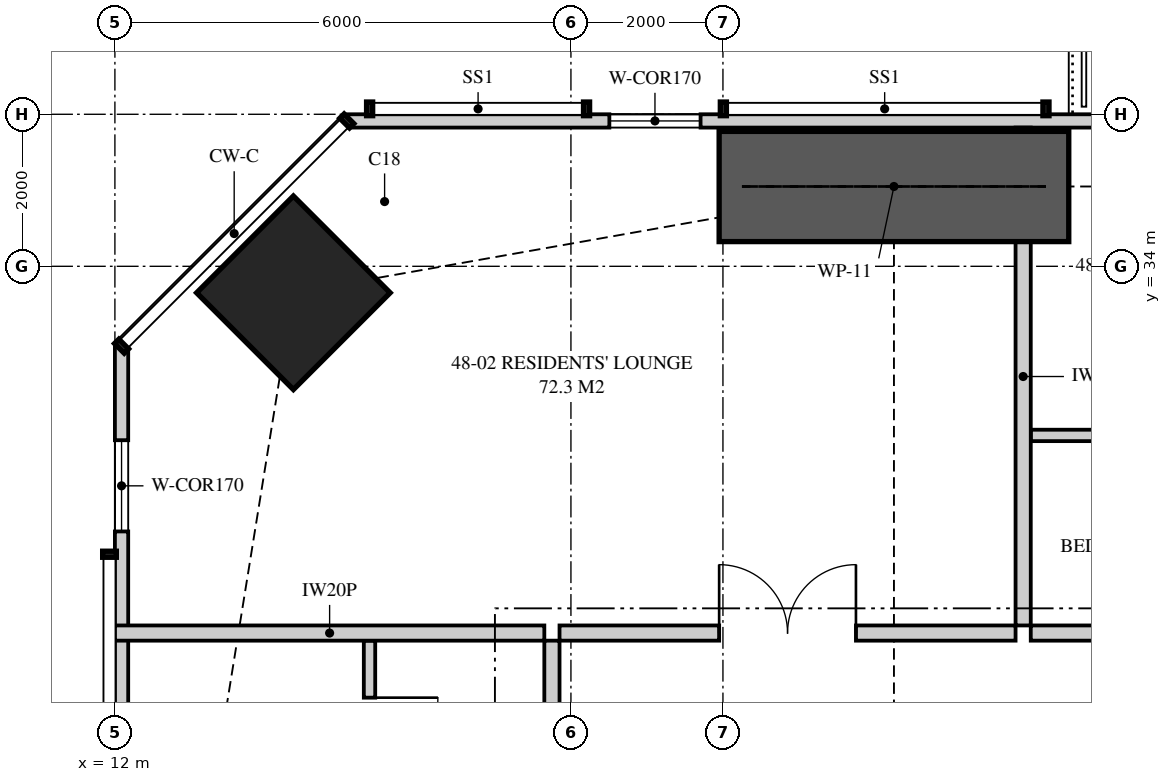
"""IFC4 building model, lengths in metres.
Left out: names, types, materials, properties, quantities, classifications, styles, units other than length and angle.
Written with IfcOpenShell. Run it as: python <this file> out.ifc"""

import sys

from ifc_helpers import new_model, si_unit, direction, frame, frame_2d, origin, origin_2d, place, context, subcontext, project, spatial, polyline, rectangle, outline, extrude, element, fill, save


model = new_model("IFC4")
c1 = context("Model", 3, precision=1e-05, world=origin(), true_north=direction((0.0, 1.0)))
c2 = subcontext(c1, "Body", "Model", "MODEL_VIEW")
j1 = project(units=[si_unit("LENGTHUNIT", "METRE"), si_unit("PLANEANGLEUNIT", "RADIAN")], contexts=[c1])
p1 = place(None, origin())
s1 = spatial("IfcSite", under=j1, at=p1, CompositionType="ELEMENT")
p2 = place(p1, origin())
s2 = spatial("IfcBuilding", under=s1, at=p2, CompositionType="ELEMENT")
p3 = place(p2, frame((0.0, 0.0, 177.8)))
s3 = spatial("IfcBuildingStorey", under=s2, at=p3, CompositionType="ELEMENT", Elevation=177.8)
p4 = place(p3, frame((14.348, 33.652, 0.0), z_axis=(0.0, 0.0, 1.0), x_axis=(0.707106781187, 0.707106781187, 0.0)))
e1 = element("IfcColumn", 1, at=p4, inside=s3, PredefinedType="COLUMN", context=c2, shape_type="SweptSolid", body=[
    extrude(rectangle(XDim=1.8, YDim=1.8, at=origin_2d()), origin(), (0.0, 0.0, 1.0), 3.35),
])
p5 = place(p3, frame((49.949, 35.913, 0.0), z_axis=(0.0, 0.0, 1.0), x_axis=(-1.0, 0.0, 0.0)))
e2 = element("IfcWall", 2, at=p5, inside=s3, PredefinedType="SOLIDWALL", context=c2, shape_type="SweptSolid", body=[
    extrude(outline(polyline([(0.0, 0.0), (34.897, 0.0), (34.897, 3.11), (27.91, 3.11), (27.91, 2.15), (27.836, 2.15), (27.836, 3.11), (27.699, 3.11), (27.699, 2.15), (7.199, 2.15), (7.199, 3.11), (7.062, 3.11), (7.062, 2.15), (6.987, 2.15), (6.987, 3.11), (0.0, 3.11), (0.0, 0.0)])), frame((0.0, 0.087, 0.0), z_axis=(0.0, -1.0, 0.0), x_axis=(1.0, 0.0, 0.0)), (0.0, 0.0, 1.0), 0.175),
])
p6 = place(p5, frame((2.3, 0.0, 0.4)))
e3 = element("IfcOpeningElement", 3, at=p6, cuts=e2, PredefinedType="OPENING", context=c2, shape_type="SweptSolid", body=[
    extrude(rectangle(XDim=2.4, YDim=1.7, at=frame_2d((1.2, 0.85))), frame((0.0, 0.097, 0.0), z_axis=(0.0, -1.0, 0.0), x_axis=(1.0, 0.0, 0.0)), (0.0, 0.0, 1.0), 0.195),
])
p7 = place(p5, frame((10.299, 0.0, 0.0)))
e4 = element("IfcOpeningElement", 4, at=p7, cuts=e2, PredefinedType="OPENING", context=c2, shape_type="SweptSolid", body=[
    extrude(rectangle(XDim=1.8, YDim=2.1, at=frame_2d((0.9, 1.05))), frame((0.0, 0.097, 0.0), z_axis=(0.0, -1.0, 0.0), x_axis=(1.0, 0.0, 0.0)), (0.0, 0.0, 1.0), 0.195),
])
p8 = place(p5, frame((13.229, 0.0, 0.4)))
e5 = element("IfcOpeningElement", 5, at=p8, cuts=e2, PredefinedType="OPENING", context=c2, shape_type="SweptSolid", body=[
    extrude(rectangle(XDim=1.8, YDim=1.7, at=frame_2d((0.9, 0.85))), frame((0.0, 0.097, 0.0), z_axis=(0.0, -1.0, 0.0), x_axis=(1.0, 0.0, 0.0)), (0.0, 0.0, 1.0), 0.195),
])
p9 = place(p5, frame((19.879, 0.0, 0.4)))
e6 = element("IfcOpeningElement", 6, at=p9, cuts=e2, PredefinedType="OPENING", context=c2, shape_type="SweptSolid", body=[
    extrude(rectangle(XDim=1.8, YDim=1.7, at=frame_2d((0.9, 0.85))), frame((0.0, 0.097, 0.0), z_axis=(0.0, -1.0, 0.0), x_axis=(1.0, 0.0, 0.0)), (0.0, 0.0, 1.0), 0.195),
])
p10 = place(p5, frame((22.699, 0.0, 0.0)))
e7 = element("IfcOpeningElement", 7, at=p10, cuts=e2, PredefinedType="OPENING", context=c2, shape_type="SweptSolid", body=[
    extrude(rectangle(XDim=1.8, YDim=2.1, at=frame_2d((0.9, 1.05))), frame((0.0, 0.097, 0.0), z_axis=(0.0, -1.0, 0.0), x_axis=(1.0, 0.0, 0.0)), (0.0, 0.0, 1.0), 0.195),
])
p11 = place(p5, frame((30.243, 0.0, 0.4)))
e8 = element("IfcOpeningElement", 8, at=p11, cuts=e2, PredefinedType="OPENING", context=c2, shape_type="SweptSolid", body=[
    extrude(rectangle(XDim=1.2, YDim=1.7, at=frame_2d((0.6, 0.85))), frame((0.0, 0.097, 0.0), z_axis=(0.0, -1.0, 0.0), x_axis=(1.0, 0.0, 0.0)), (0.0, 0.0, 1.0), 0.195),
])
p12 = place(p3, frame((12.087, 32.949, 0.0), z_axis=(0.0, 0.0, 1.0), x_axis=(0.0, -1.0, 0.0)))
e9 = element("IfcWall", 9, at=p12, inside=s3, PredefinedType="SOLIDWALL", context=c2, shape_type="SweptSolid", body=[
    extrude(outline(polyline([(0.0, 0.0), (29.897, 0.0), (29.897, 3.11), (20.191, 3.11), (20.191, 2.15), (20.051, 2.15), (20.051, 3.11), (19.949, 3.11), (19.949, 2.15), (7.949, 2.15), (7.949, 3.11), (7.823, 3.11), (7.823, 2.15), (7.73, 2.15), (7.73, 3.11), (0.0, 3.11), (0.0, 0.0)])), frame((0.0, 0.087, 0.0), z_axis=(0.0, -1.0, 0.0), x_axis=(1.0, 0.0, 0.0)), (0.0, 0.0, 1.0), 0.175),
])
p13 = place(p12, frame((1.237, 0.0, 0.4)))
e10 = element("IfcOpeningElement", 10, at=p13, cuts=e9, PredefinedType="OPENING", context=c2, shape_type="SweptSolid", body=[
    extrude(rectangle(XDim=1.2, YDim=1.7, at=frame_2d((0.6, 0.85))), frame((0.0, 0.097, 0.0), z_axis=(0.0, -1.0, 0.0), x_axis=(1.0, 0.0, 0.0)), (0.0, 0.0, 1.0), 0.195),
])
p14 = place(p12, frame((10.482, 0.0, 0.4)))
e11 = element("IfcOpeningElement", 11, at=p14, cuts=e9, PredefinedType="OPENING", context=c2, shape_type="SweptSolid", body=[
    extrude(rectangle(XDim=2.4, YDim=1.7, at=frame_2d((1.2, 0.85))), frame((0.0, 0.097, 0.0), z_axis=(0.0, -1.0, 0.0), x_axis=(1.0, 0.0, 0.0)), (0.0, 0.0, 1.0), 0.195),
])
p15 = place(p12, frame((15.735, 0.0, 0.4)))
e12 = element("IfcOpeningElement", 12, at=p15, cuts=e9, PredefinedType="OPENING", context=c2, shape_type="SweptSolid", body=[
    extrude(rectangle(XDim=1.8, YDim=1.7, at=frame_2d((0.9, 0.85))), frame((0.0, 0.097, 0.0), z_axis=(0.0, -1.0, 0.0), x_axis=(1.0, 0.0, 0.0)), (0.0, 0.0, 1.0), 0.195),
])
p16 = place(p12, frame((22.624, 0.0, 0.0)))
e13 = element("IfcOpeningElement", 13, at=p16, cuts=e9, PredefinedType="OPENING", context=c2, shape_type="SweptSolid", body=[
    extrude(rectangle(XDim=1.8, YDim=2.1, at=frame_2d((0.9, 1.05))), frame((0.0, 0.097, 0.0), z_axis=(0.0, -1.0, 0.0), x_axis=(1.0, 0.0, 0.0)), (0.0, 0.0, 1.0), 0.195),
])
p17 = place(p12, frame((26.301, 0.0, 0.4)))
e14 = element("IfcOpeningElement", 14, at=p17, cuts=e9, PredefinedType="OPENING", context=c2, shape_type="SweptSolid", body=[
    extrude(rectangle(XDim=1.8, YDim=1.7, at=frame_2d((0.9, 0.85))), frame((0.0, 0.097, 0.0), z_axis=(0.0, -1.0, 0.0), x_axis=(1.0, 0.0, 0.0)), (0.0, 0.0, 1.0), 0.195),
])
p18 = place(p3, frame((23.95, 35.825, 0.0), z_axis=(0.0, 0.0, 1.0), x_axis=(0.0, -1.0, 0.0)))
e15 = element("IfcWall", 15, at=p18, inside=s3, PredefinedType="PARTITIONING", context=c2, shape_type="SweptSolid", body=[
    extrude(outline(polyline([(0.529, 2.15), (0.0, 2.15), (0.0, 0.0), (0.529, 0.0), (0.529, 0.123), (1.021, 0.123), (1.021, 0.0), (6.55, 0.0), (6.55, 3.11), (1.685, 3.11), (1.685, 2.15), (1.021, 2.15), (1.021, 2.027), (0.529, 2.027), (0.529, 2.15)])), frame((0.0, 0.1, 0.0), z_axis=(0.0, -1.0, 0.0), x_axis=(1.0, 0.0, 0.0)), (0.0, 0.0, 1.0), 0.2),
])
p19 = place(p3, frame((17.85, 29.175, 0.0), z_axis=(0.0, 0.0, 1.0), x_axis=(1.0, 0.0, 0.0)))
e16 = element("IfcWall", 16, at=p19, inside=s3, PredefinedType="PARTITIONING", context=c2, shape_type="SweptSolid", body=[
    extrude(outline(polyline([(0.0, 0.0), (6.0, 0.0), (6.0, 3.11), (4.737, 3.11), (4.737, 2.541), (4.062, 2.541), (4.062, 3.11), (0.0, 3.11), (0.0, 0.0)])), frame((0.0, 0.1, 0.0), z_axis=(0.0, -1.0, 0.0), x_axis=(1.0, 0.0, 0.0)), (0.0, 0.0, 1.0), 0.2),
])
p20 = place(p19, frame((2.1, 0.0, 0.0)))
e17 = element("IfcOpeningElement", 17, at=p20, cuts=e16, PredefinedType="OPENING", context=c2, shape_type="SweptSolid", body=[
    extrude(rectangle(XDim=1.8, YDim=2.1, at=frame_2d((0.9, 1.05))), frame((0.0, 0.11, 0.0), z_axis=(0.0, -1.0, 0.0), x_axis=(1.0, 0.0, 0.0)), (0.0, 0.0, 1.0), 0.22),
])
p21 = place(p3, frame((24.05, 29.175, 0.0), z_axis=(0.0, 0.0, 1.0), x_axis=(1.0, 0.0, 0.0)))
e18 = element("IfcWall", 18, at=p21, inside=s3, PredefinedType="PARTITIONING", context=c2, shape_type="SweptSolid", body=[
    extrude(outline(polyline([(0.0, 0.0), (21.9, 0.0), (21.9, 3.11), (19.037, 3.11), (19.037, 2.541), (18.363, 2.541), (18.363, 3.11), (8.787, 3.11), (8.787, 2.541), (8.113, 2.541), (8.113, 3.11), (0.0, 3.11), (0.0, 0.0)])), frame((0.0, 0.1, 0.0), z_axis=(0.0, -1.0, 0.0), x_axis=(1.0, 0.0, 0.0)), (0.0, 0.0, 1.0), 0.2),
])
p22 = place(p21, frame((13.925, 0.0, 0.0)))
e19 = element("IfcOpeningElement", 19, at=p22, cuts=e18, PredefinedType="OPENING", context=c2, shape_type="SweptSolid", body=[
    extrude(rectangle(XDim=1.05, YDim=2.2, at=frame_2d((0.525, 1.1))), frame((0.0, 0.11, 0.0), z_axis=(0.0, -1.0, 0.0), x_axis=(1.0, 0.0, 0.0)), (0.0, 0.0, 1.0), 0.22),
])
p23 = place(p3, frame((24.05, 31.775, 0.0), z_axis=(0.0, 0.0, 1.0), x_axis=(1.0, 0.0, 0.0)))
e20 = element("IfcWall", 20, at=p23, inside=s3, PredefinedType="PLUMBINGWALL", context=c2, shape_type="SweptSolid", body=[
    extrude(rectangle(XDim=3.45, YDim=0.15, at=frame_2d((1.725, 0.0))), origin(), (0.0, 0.0, 1.0), 3.11),
])
p24 = place(p23, frame((2.15, 0.0, 0.0)))
e21 = element("IfcOpeningElement", 21, at=p24, cuts=e20, PredefinedType="OPENING", context=c2, shape_type="SweptSolid", body=[
    extrude(rectangle(XDim=0.9, YDim=2.1, at=frame_2d((0.45, 1.05))), frame((0.0, 0.085, 0.0), z_axis=(0.0, -1.0, 0.0), x_axis=(1.0, 0.0, 0.0)), (0.0, 0.0, 1.0), 0.17),
])
p25 = place(p3, frame((12.0, 29.175, 0.0), z_axis=(0.0, 0.0, 1.0), x_axis=(1.0, 0.0, 0.0)))
e22 = element("IfcWall", 22, at=p25, inside=s3, PredefinedType="PARTITIONING", context=c2, shape_type="SweptSolid", body=[
    extrude(outline(polyline([(0.0, 0.0), (5.65, 0.0), (5.65, 3.11), (2.547, 3.11), (2.547, 2.15), (0.703, 2.15), (0.703, 3.11), (0.0, 3.11), (0.0, 0.0)])), frame((0.0, 0.1, 0.0), z_axis=(0.0, -1.0, 0.0), x_axis=(1.0, 0.0, 0.0)), (0.0, 0.0, 1.0), 0.2),
])
p26 = place(p3, frame((17.75, 13.95, 0.0), z_axis=(0.0, 0.0, 1.0), x_axis=(0.0, 1.0, 0.0)))
e23 = element("IfcWall", 23, at=p26, inside=s3, PredefinedType="PARTITIONING", context=c2, shape_type="SweptSolid", body=[
    extrude(outline(polyline([(0.0, 0.0), (15.125, 0.0), (15.125, 3.11), (11.387, 3.11), (11.387, 2.541), (10.713, 2.541), (10.713, 3.11), (0.0, 3.11), (0.0, 0.0)])), frame((0.0, 0.1, 0.0), z_axis=(0.0, -1.0, 0.0), x_axis=(1.0, 0.0, 0.0)), (0.0, 0.0, 1.0), 0.2),
])
p27 = place(p26, frame((7.062, 0.0, 0.0)))
e24 = element("IfcOpeningElement", 24, at=p27, cuts=e23, PredefinedType="OPENING", context=c2, shape_type="SweptSolid", body=[
    extrude(rectangle(XDim=1.05, YDim=2.2, at=frame_2d((0.525, 1.1))), frame((0.0, 0.11, 0.0), z_axis=(0.0, -1.0, 0.0), x_axis=(1.0, 0.0, 0.0)), (0.0, 0.0, 1.0), 0.22),
])
p28 = place(p3, frame((15.35, 26.65, 0.0), z_axis=(0.0, 0.0, 1.0), x_axis=(0.0, 1.0, 0.0)))
e25 = element("IfcWall", 25, at=p28, inside=s3, PredefinedType="PLUMBINGWALL", context=c2, shape_type="SweptSolid", body=[
    extrude(rectangle(XDim=2.425, YDim=0.15, at=frame_2d((1.212, 0.0))), origin(), (0.0, 0.0, 1.0), 3.11),
])
p29 = place(p28, frame((0.775, 0.0, 0.0)))
e26 = element("IfcOpeningElement", 26, at=p29, cuts=e25, PredefinedType="OPENING", context=c2, shape_type="SweptSolid", body=[
    extrude(rectangle(XDim=0.9, YDim=2.1, at=frame_2d((0.45, 1.05))), frame((0.0, 0.085, 0.0), z_axis=(0.0, -1.0, 0.0), x_axis=(1.0, 0.0, 0.0)), (0.0, 0.0, 1.0), 0.17),
])
p30 = place(p3, frame((19.95, 35.05, 0.0), z_axis=(0.0, 0.0, 1.0), x_axis=(1.0, 0.0, 0.0)))
e27 = element("IfcWall", 27, at=p30, inside=s3, PredefinedType="SHEAR", context=c2, shape_type="SweptSolid", body=[
    extrude(rectangle(XDim=4.6, YDim=1.45, at=frame_2d((2.3, 0.0))), origin(), (0.0, 0.0, 1.0), 3.35),
])
p31 = place(p11, origin())
e28 = element("IfcWindow", 28, at=p31, inside=s3, PartitioningType="SINGLE_PANEL", PredefinedType="WINDOW", context=c2, shape_type="SweptSolid", body=[
    extrude(rectangle(XDim=1.2, YDim=1.7, at=frame_2d((0.6, 0.85))), frame((0.0, 0.03, 0.0), z_axis=(0.0, -1.0, 0.0), x_axis=(1.0, 0.0, 0.0)), (0.0, 0.0, 1.0), 0.06),
])
fill(e8, e28)
p32 = place(p13, origin())
e29 = element("IfcWindow", 29, at=p32, inside=s3, PartitioningType="SINGLE_PANEL", PredefinedType="WINDOW", context=c2, shape_type="SweptSolid", body=[
    extrude(rectangle(XDim=1.2, YDim=1.7, at=frame_2d((0.6, 0.85))), frame((0.0, 0.03, 0.0), z_axis=(0.0, -1.0, 0.0), x_axis=(1.0, 0.0, 0.0)), (0.0, 0.0, 1.0), 0.06),
])
fill(e10, e29)
p33 = place(p20, origin())
e30 = element("IfcDoor", 30, at=p33, inside=s3, OperationType="DOUBLE_DOOR_SINGLE_SWING", PredefinedType="DOOR", context=c2, shape_type="SweptSolid", body=[
    extrude(rectangle(XDim=1.8, YDim=2.1, at=frame_2d((0.9, 1.05))), frame((0.0, 0.025, 0.0), z_axis=(0.0, -1.0, 0.0), x_axis=(1.0, 0.0, 0.0)), (0.0, 0.0, 1.0), 0.05),
])
fill(e17, e30)
p34 = place(p29, frame((0.9, 0.0, 0.0), z_axis=(0.0, 0.0, 1.0), x_axis=(-1.0, 0.0, 0.0)))
e31 = element("IfcDoor", 31, at=p34, inside=s3, OperationType="SINGLE_SWING_LEFT", PredefinedType="DOOR", context=c2, shape_type="SweptSolid", body=[
    extrude(rectangle(XDim=0.9, YDim=2.1, at=frame_2d((0.45, 1.05))), frame((0.0, 0.025, 0.0), z_axis=(0.0, -1.0, 0.0), x_axis=(1.0, 0.0, 0.0)), (0.0, 0.0, 1.0), 0.05),
])
fill(e26, e31)
save(model, sys.argv[1])
